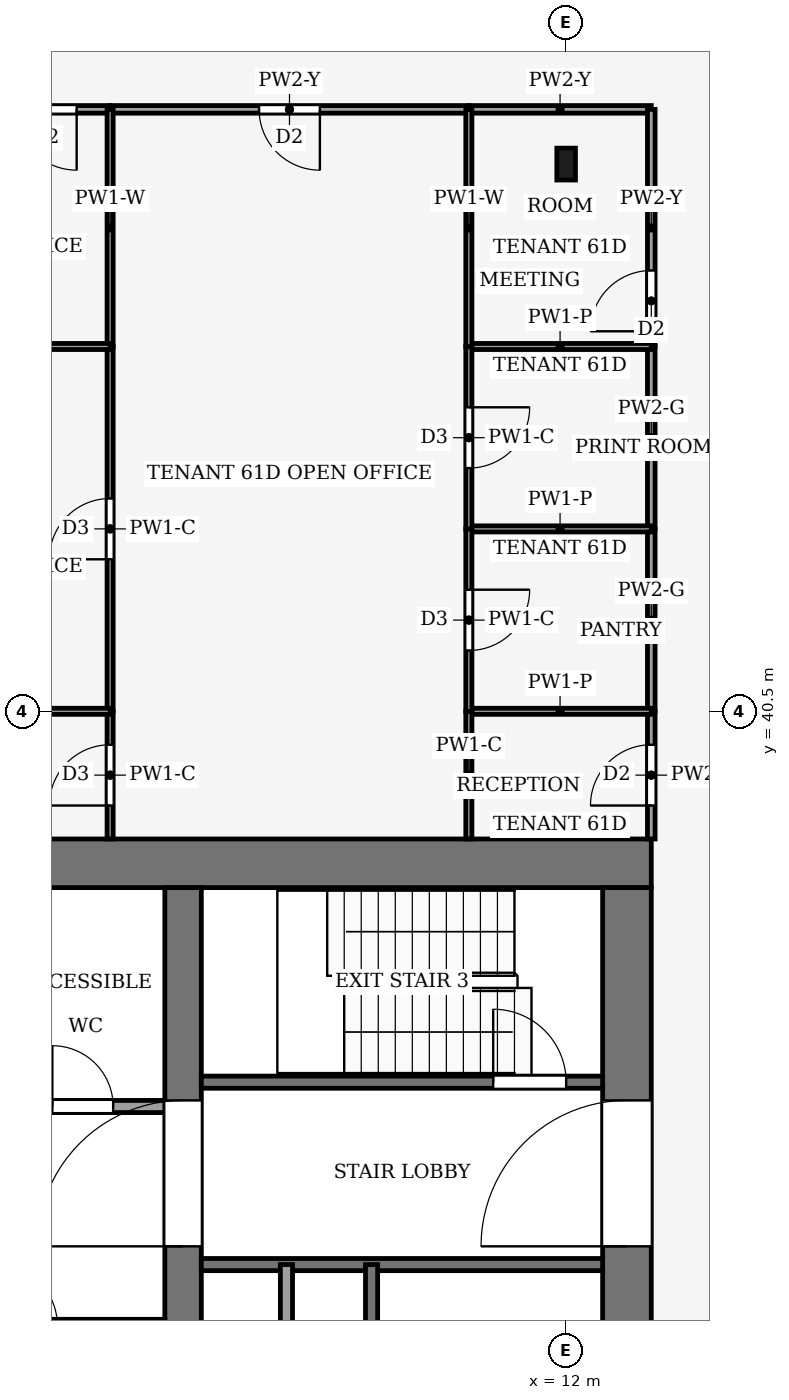
"""IFC4 building model, lengths in metres.
Left out: names, types, materials, properties, quantities, classifications, styles, units other than length and angle.
Written with IfcOpenShell. Run it as: python <this file> out.ifc"""

import sys

from ifc_helpers import new_model, si_unit, direction, frame, frame_2d, origin, origin_2d, place, context, subcontext, project, spatial, rectangle, i_section, extrude, element, fill, save


model = new_model("IFC4")
c1 = context("Model", 3, precision=1e-05, world=origin(), true_north=direction((0.0, 1.0)))
c2 = subcontext(c1, "Body", "Model", "MODEL_VIEW")
j1 = project(units=[si_unit("LENGTHUNIT", "METRE"), si_unit("PLANEANGLEUNIT", "RADIAN")], contexts=[c1])
p1 = place(None, origin())
s1 = spatial("IfcSite", under=j1, at=p1, CompositionType="ELEMENT")
p2 = place(p1, origin())
s2 = spatial("IfcBuilding", under=s1, at=p2, CompositionType="ELEMENT")
p3 = place(p2, frame((0.0, 0.0, 266.0)))
s3 = spatial("IfcBuildingStorey", under=s2, at=p3, CompositionType="ELEMENT", Elevation=266.0)
p4 = place(p3, frame((-13.4, 38.0, -0.13), z_axis=(0.0, 0.0, 1.0), x_axis=(1.0, 0.0, 0.0)))
e1 = element("IfcWall", 1, at=p4, inside=s3, PredefinedType="SHEAR", context=c2, shape_type="SweptSolid", body=[
    extrude(rectangle(XDim=26.8, YDim=0.8, at=frame_2d((13.4, 0.0))), origin(), (0.0, 0.0, 1.0), 4.0),
])
p5 = place(p3, frame((13.0, 18.4, -0.13), z_axis=(0.0, 0.0, 1.0), x_axis=(0.0, 1.0, 0.0)))
e2 = element("IfcWall", 2, at=p5, inside=s3, PredefinedType="SHEAR", context=c2, shape_type="SweptSolid", body=[
    extrude(rectangle(XDim=19.2, YDim=0.8, at=frame_2d((9.6, 0.0))), origin(), (0.0, 0.0, 1.0), 4.0),
])
p6 = place(p5, frame((2.8, 0.0, 0.13)))
e3 = element("IfcOpeningElement", 3, at=p6, cuts=e2, PredefinedType="OPENING", context=c2, shape_type="SweptSolid", body=[
    extrude(rectangle(XDim=2.4, YDim=2.4, at=frame_2d((1.2, 1.2))), frame((0.0, 0.41, 0.0), z_axis=(0.0, -1.0, 0.0), x_axis=(1.0, 0.0, 0.0)), (0.0, 0.0, 1.0), 0.82),
])
p7 = place(p5, frame((13.3, 0.0, 0.13)))
e4 = element("IfcOpeningElement", 4, at=p7, cuts=e2, PredefinedType="OPENING", context=c2, shape_type="SweptSolid", body=[
    extrude(rectangle(XDim=2.4, YDim=2.4, at=frame_2d((1.2, 1.2))), frame((0.0, 0.41, 0.0), z_axis=(0.0, -1.0, 0.0), x_axis=(1.0, 0.0, 0.0)), (0.0, 0.0, 1.0), 0.82),
])
p8 = place(p3, frame((5.7, 18.4, -0.13), z_axis=(0.0, 0.0, 1.0), x_axis=(0.0, 1.0, 0.0)))
e5 = element("IfcWall", 5, at=p8, inside=s3, PredefinedType="SHEAR", context=c2, shape_type="SweptSolid", body=[
    extrude(rectangle(XDim=19.2, YDim=0.6, at=frame_2d((9.6, 0.0))), origin(), (0.0, 0.0, 1.0), 4.0),
])
p9 = place(p8, frame((13.3, 0.0, 0.13)))
e6 = element("IfcOpeningElement", 6, at=p9, cuts=e5, PredefinedType="OPENING", context=c2, shape_type="SweptSolid", body=[
    extrude(rectangle(XDim=2.4, YDim=2.4, at=frame_2d((1.2, 1.2))), frame((0.0, 0.31, 0.0), z_axis=(0.0, -1.0, 0.0), x_axis=(1.0, 0.0, 0.0)), (0.0, 0.0, 1.0), 0.62),
])
p10 = place(p3, frame((12.0, 49.5, 0.0), z_axis=(0.0, 0.0, 1.0), x_axis=(1.0, 0.0, 0.0)))
e7 = element("IfcColumn", 7, at=p10, inside=s3, PredefinedType="COLUMN", context=c2, shape_type="SweptSolid", body=[
    extrude(i_section(OverallWidth=0.306, OverallDepth=0.524, WebThickness=0.012, FlangeThickness=0.04, FilletRadius=0.027, at=origin_2d()), origin(), (0.0, 0.0, 1.0), 4.0),
])
p11 = place(p3, frame((6.0, 31.4, 0.0), z_axis=(0.0, 0.0, 1.0), x_axis=(1.0, 0.0, 0.0)))
e8 = element("IfcWall", 8, at=p11, inside=s3, PredefinedType="PARTITIONING", context=c2, shape_type="SweptSolid", body=[
    extrude(rectangle(XDim=6.6, YDim=0.2, at=frame_2d((3.3, 0.0))), origin(), (0.0, 0.0, 1.0), 3.87),
])
p12 = place(p3, frame((-5.4, 34.0, 0.0), z_axis=(0.0, 0.0, 1.0), x_axis=(1.0, 0.0, 0.0)))
e9 = element("IfcWall", 9, at=p12, inside=s3, PredefinedType="PARTITIONING", context=c2, shape_type="SweptSolid", body=[
    extrude(rectangle(XDim=10.8, YDim=0.2, at=frame_2d((5.4, 0.0))), origin(), (0.0, 0.0, 1.0), 3.87),
])
p13 = place(p12, frame((6.15, 0.0, 0.0)))
e10 = element("IfcOpeningElement", 10, at=p13, cuts=e9, PredefinedType="OPENING", context=c2, shape_type="SweptSolid", body=[
    extrude(rectangle(XDim=1.2, YDim=2.2, at=frame_2d((0.6, 1.1))), frame((0.0, 0.11, 0.0), z_axis=(0.0, -1.0, 0.0), x_axis=(1.0, 0.0, 0.0)), (0.0, 0.0, 1.0), 0.22),
])
p14 = place(p12, frame((8.95, 0.0, 0.0)))
e11 = element("IfcOpeningElement", 11, at=p14, cuts=e9, PredefinedType="OPENING", context=c2, shape_type="SweptSolid", body=[
    extrude(rectangle(XDim=1.0, YDim=2.1, at=frame_2d((0.5, 1.05))), frame((0.0, 0.11, 0.0), z_axis=(0.0, -1.0, 0.0), x_axis=(1.0, 0.0, 0.0)), (0.0, 0.0, 1.0), 0.22),
])
p15 = place(p3, frame((6.0, 34.4, 0.0), z_axis=(0.0, 0.0, 1.0), x_axis=(1.0, 0.0, 0.0)))
e12 = element("IfcWall", 12, at=p15, inside=s3, PredefinedType="PARTITIONING", context=c2, shape_type="SweptSolid", body=[
    extrude(rectangle(XDim=6.6, YDim=0.2, at=frame_2d((3.3, 0.0))), origin(), (0.0, 0.0, 1.0), 3.87),
])
p16 = place(p15, frame((4.8, 0.0, 0.0)))
e13 = element("IfcOpeningElement", 13, at=p16, cuts=e12, PredefinedType="OPENING", context=c2, shape_type="SweptSolid", body=[
    extrude(rectangle(XDim=1.2, YDim=2.2, at=frame_2d((0.6, 1.1))), frame((0.0, 0.11, 0.0), z_axis=(0.0, -1.0, 0.0), x_axis=(1.0, 0.0, 0.0)), (0.0, 0.0, 1.0), 0.22),
])
for number, where, z_axis, x_axis in (
    (14, (7.4, 24.0, 0.0), (0.0, 0.0, 1.0), (0.0, 1.0, 0.0)),
    (15, (8.8, 24.0, 0.0), (0.0, 0.0, 1.0), (0.0, 1.0, 0.0)),
):
    element("IfcWall", number, at=place(p3, frame(where, z_axis=z_axis, x_axis=x_axis)), inside=s3, PredefinedType="PARTITIONING", context=c2, shape_type="SweptSolid", body=[
        extrude(rectangle(XDim=7.4, YDim=0.2, at=frame_2d((3.7, 0.0))), origin(), (0.0, 0.0, 1.0), 3.87),
    ])
p17 = place(p3, frame((13.4, 38.4, 0.0), z_axis=(0.0, 0.0, 1.0), x_axis=(0.0, 1.0, 0.0)))
e16 = element("IfcWall", 16, at=p17, inside=s3, PredefinedType="PARTITIONING", context=c2, shape_type="SweptSolid", body=[
    extrude(rectangle(XDim=2.1, YDim=0.125, at=frame_2d((1.05, 0.0))), origin(), (0.0, 0.0, 1.0), 3.14),
])
p18 = place(p17, frame((0.55, 0.0, 0.0)))
e17 = element("IfcOpeningElement", 17, at=p18, cuts=e16, PredefinedType="OPENING", context=c2, shape_type="SweptSolid", body=[
    extrude(rectangle(XDim=1.0, YDim=2.1, at=frame_2d((0.5, 1.05))), frame((0.0, 0.073, 0.0), z_axis=(0.0, -1.0, 0.0), x_axis=(1.0, 0.0, 0.0)), (0.0, 0.0, 1.0), 0.145),
])
for number, where, z_axis, x_axis in (
    (18, (13.4, 40.5, 0.0), (0.0, 0.0, 1.0), (0.0, 1.0, 0.0)),
    (19, (13.4, 43.5, 0.0), (0.0, 0.0, 1.0), (0.0, 1.0, 0.0)),
):
    element("IfcWall", number, at=place(p3, frame(where, z_axis=z_axis, x_axis=x_axis)), inside=s3, PredefinedType="PARTITIONING", context=c2, shape_type="SweptSolid", body=[
        extrude(rectangle(XDim=3.0, YDim=0.125, at=frame_2d((1.5, 0.0))), origin(), (0.0, 0.0, 1.0), 3.87),
    ])
p19 = place(p3, frame((13.4, 50.4, 0.0), z_axis=(0.0, 0.0, 1.0), x_axis=(-1.0, 0.0, 0.0)))
e20 = element("IfcWall", 20, at=p19, inside=s3, PredefinedType="PARTITIONING", context=c2, shape_type="SweptSolid", body=[
    extrude(rectangle(XDim=3.0, YDim=0.125, at=frame_2d((1.5, 0.0))), origin(), (0.0, 0.0, 1.0), 3.24),
])
p20 = place(p3, frame((13.4, 46.5, 0.0), z_axis=(0.0, 0.0, 1.0), x_axis=(0.0, 1.0, 0.0)))
e21 = element("IfcWall", 21, at=p20, inside=s3, PredefinedType="PARTITIONING", context=c2, shape_type="SweptSolid", body=[
    extrude(rectangle(XDim=3.9, YDim=0.125, at=frame_2d((1.95, 0.0))), origin(), (0.0, 0.0, 1.0), 3.24),
])
p21 = place(p20, frame((0.25, 0.0, 0.0)))
e22 = element("IfcOpeningElement", 22, at=p21, cuts=e21, PredefinedType="OPENING", context=c2, shape_type="SweptSolid", body=[
    extrude(rectangle(XDim=1.0, YDim=2.1, at=frame_2d((0.5, 1.05))), frame((0.0, 0.073, 0.0), z_axis=(0.0, -1.0, 0.0), x_axis=(1.0, 0.0, 0.0)), (0.0, 0.0, 1.0), 0.145),
])
p22 = place(p3, frame((10.4, 50.4, 0.0), z_axis=(0.0, 0.0, 1.0), x_axis=(-1.0, 0.0, 0.0)))
e23 = element("IfcWall", 23, at=p22, inside=s3, PredefinedType="PARTITIONING", context=c2, shape_type="SweptSolid", body=[
    extrude(rectangle(XDim=5.9, YDim=0.125, at=frame_2d((2.95, 0.0))), origin(), (0.0, 0.0, 1.0), 3.24),
])
p23 = place(p22, frame((2.45, 0.0, 0.0)))
e24 = element("IfcOpeningElement", 24, at=p23, cuts=e23, PredefinedType="OPENING", context=c2, shape_type="SweptSolid", body=[
    extrude(rectangle(XDim=1.0, YDim=2.1, at=frame_2d((0.5, 1.05))), frame((0.0, 0.073, 0.0), z_axis=(0.0, -1.0, 0.0), x_axis=(1.0, 0.0, 0.0)), (0.0, 0.0, 1.0), 0.145),
])
p24 = place(p3, frame((4.5, 50.4, 0.0), z_axis=(0.0, 0.0, 1.0), x_axis=(-1.0, 0.0, 0.0)))
e25 = element("IfcWall", 25, at=p24, inside=s3, PredefinedType="PARTITIONING", context=c2, shape_type="SweptSolid", body=[
    extrude(rectangle(XDim=4.5, YDim=0.125, at=frame_2d((2.25, 0.0))), origin(), (0.0, 0.0, 1.0), 3.24),
])
p25 = place(p24, frame((0.55, 0.0, 0.0)))
e26 = element("IfcOpeningElement", 26, at=p25, cuts=e25, PredefinedType="OPENING", context=c2, shape_type="SweptSolid", body=[
    extrude(rectangle(XDim=1.0, YDim=2.1, at=frame_2d((0.5, 1.05))), frame((0.0, 0.073, 0.0), z_axis=(0.0, -1.0, 0.0), x_axis=(1.0, 0.0, 0.0)), (0.0, 0.0, 1.0), 0.145),
])
p26 = place(p3, frame((13.4, 40.5, 0.0), z_axis=(0.0, 0.0, 1.0), x_axis=(-1.0, 0.0, 0.0)))
e27 = element("IfcWall", 27, at=p26, inside=s3, PredefinedType="PARTITIONING", context=c2, shape_type="SweptSolid", body=[
    extrude(rectangle(XDim=3.0, YDim=0.1, at=frame_2d((1.5, 0.0))), origin(), (0.0, 0.0, 1.0), 3.44),
])
p27 = place(p3, frame((10.4, 40.504, 0.0), z_axis=(0.0, 0.0, 1.0), x_axis=(0.0, -1.0, 0.0)))
e28 = element("IfcWall", 28, at=p27, inside=s3, PredefinedType="PARTITIONING", context=c2, shape_type="SweptSolid", body=[
    extrude(rectangle(XDim=2.104, YDim=0.1, at=frame_2d((1.052, 0.0))), origin(), (0.0, 0.0, 1.0), 3.87),
])
p28 = place(p3, frame((13.4, 43.5, 0.0), z_axis=(0.0, 0.0, 1.0), x_axis=(-1.0, 0.0, 0.0)))
e29 = element("IfcWall", 29, at=p28, inside=s3, PredefinedType="PARTITIONING", context=c2, shape_type="SweptSolid", body=[
    extrude(rectangle(XDim=3.0, YDim=0.1, at=frame_2d((1.5, 0.0))), origin(), (0.0, 0.0, 1.0), 3.44),
])
p29 = place(p3, frame((10.4, 43.504, 0.0), z_axis=(0.0, 0.0, 1.0), x_axis=(0.0, -1.0, 0.0)))
e30 = element("IfcWall", 30, at=p29, inside=s3, PredefinedType="PARTITIONING", context=c2, shape_type="SweptSolid", body=[
    extrude(rectangle(XDim=3.008, YDim=0.1, at=frame_2d((1.504, 0.0))), origin(), (0.0, 0.0, 1.0), 3.87),
])
p30 = place(p29, frame((1.004, 0.0, 0.0)))
e31 = element("IfcOpeningElement", 31, at=p30, cuts=e30, PredefinedType="OPENING", context=c2, shape_type="SweptSolid", body=[
    extrude(rectangle(XDim=1.0, YDim=2.1, at=frame_2d((0.5, 1.05))), frame((0.0, 0.06, 0.0), z_axis=(0.0, -1.0, 0.0), x_axis=(1.0, 0.0, 0.0)), (0.0, 0.0, 1.0), 0.12),
])
p31 = place(p3, frame((13.4, 46.5, 0.0), z_axis=(0.0, 0.0, 1.0), x_axis=(-1.0, 0.0, 0.0)))
e32 = element("IfcWall", 32, at=p31, inside=s3, PredefinedType="PARTITIONING", context=c2, shape_type="SweptSolid", body=[
    extrude(rectangle(XDim=3.0, YDim=0.1, at=frame_2d((1.5, 0.0))), origin(), (0.0, 0.0, 1.0), 3.44),
])
p32 = place(p3, frame((10.4, 46.504, 0.0), z_axis=(0.0, 0.0, 1.0), x_axis=(0.0, -1.0, 0.0)))
e33 = element("IfcWall", 33, at=p32, inside=s3, PredefinedType="PARTITIONING", context=c2, shape_type="SweptSolid", body=[
    extrude(rectangle(XDim=3.008, YDim=0.1, at=frame_2d((1.504, 0.0))), origin(), (0.0, 0.0, 1.0), 3.87),
])
p33 = place(p32, frame((1.004, 0.0, 0.0)))
e34 = element("IfcOpeningElement", 34, at=p33, cuts=e33, PredefinedType="OPENING", context=c2, shape_type="SweptSolid", body=[
    extrude(rectangle(XDim=1.0, YDim=2.1, at=frame_2d((0.5, 1.05))), frame((0.0, 0.06, 0.0), z_axis=(0.0, -1.0, 0.0), x_axis=(1.0, 0.0, 0.0)), (0.0, 0.0, 1.0), 0.12),
])
p34 = place(p3, frame((10.4, 50.4, 0.0), z_axis=(0.0, 0.0, 1.0), x_axis=(0.0, -1.0, 0.0)))
e35 = element("IfcWall", 35, at=p34, inside=s3, PredefinedType="PARTITIONING", context=c2, shape_type="SweptSolid", body=[
    extrude(rectangle(XDim=3.904, YDim=0.1, at=frame_2d((1.952, 0.0))), origin(), (0.0, 0.0, 1.0), 3.24),
])
p35 = place(p3, frame((4.5, 38.4, 0.0), z_axis=(0.0, 0.0, 1.0), x_axis=(0.0, 1.0, 0.0)))
e36 = element("IfcWall", 36, at=p35, inside=s3, PredefinedType="PARTITIONING", context=c2, shape_type="SweptSolid", body=[
    extrude(rectangle(XDim=2.1, YDim=0.1, at=frame_2d((1.05, 0.0))), origin(), (0.0, 0.0, 1.0), 3.87),
])
p36 = place(p35, frame((0.55, 0.0, 0.0)))
e37 = element("IfcOpeningElement", 37, at=p36, cuts=e36, PredefinedType="OPENING", context=c2, shape_type="SweptSolid", body=[
    extrude(rectangle(XDim=1.0, YDim=2.1, at=frame_2d((0.5, 1.05))), frame((0.0, 0.06, 0.0), z_axis=(0.0, -1.0, 0.0), x_axis=(1.0, 0.0, 0.0)), (0.0, 0.0, 1.0), 0.12),
])
p37 = place(p3, frame((4.5, 40.5, 0.0), z_axis=(0.0, 0.0, 1.0), x_axis=(0.0, 1.0, 0.0)))
e38 = element("IfcWall", 38, at=p37, inside=s3, PredefinedType="PARTITIONING", context=c2, shape_type="SweptSolid", body=[
    extrude(rectangle(XDim=6.0, YDim=0.1, at=frame_2d((3.0, 0.0))), origin(), (0.0, 0.0, 1.0), 3.87),
])
p38 = place(p37, frame((2.5, 0.0, 0.0)))
e39 = element("IfcOpeningElement", 39, at=p38, cuts=e38, PredefinedType="OPENING", context=c2, shape_type="SweptSolid", body=[
    extrude(rectangle(XDim=1.0, YDim=2.1, at=frame_2d((0.5, 1.05))), frame((0.0, 0.06, 0.0), z_axis=(0.0, -1.0, 0.0), x_axis=(1.0, 0.0, 0.0)), (0.0, 0.0, 1.0), 0.12),
])
p39 = place(p3, frame((4.5, 50.4, 0.0), z_axis=(0.0, 0.0, 1.0), x_axis=(0.0, -1.0, 0.0)))
e40 = element("IfcWall", 40, at=p39, inside=s3, PredefinedType="PARTITIONING", context=c2, shape_type="SweptSolid", body=[
    extrude(rectangle(XDim=3.9, YDim=0.1, at=frame_2d((1.95, 0.0))), origin(), (0.0, 0.0, 1.0), 3.24),
])
for number, where, z_axis, x_axis in (
    (41, (4.5, 40.5, 0.0), (0.0, 0.0, 1.0), (-1.0, 0.0, 0.0)),
    (42, (4.5, 46.5, 0.0), (0.0, 0.0, 1.0), (-1.0, 0.0, 0.0)),
):
    element("IfcWall", number, at=place(p3, frame(where, z_axis=z_axis, x_axis=x_axis)), inside=s3, PredefinedType="PARTITIONING", context=c2, shape_type="SweptSolid", body=[
        extrude(rectangle(XDim=4.5, YDim=0.1, at=frame_2d((2.25, 0.0))), origin(), (0.0, 0.0, 1.0), 3.44),
    ])
p40 = place(p14, origin())
e43 = element("IfcDoor", 43, at=p40, inside=s3, OperationType="SINGLE_SWING_LEFT", PredefinedType="DOOR", context=c2, shape_type="SweptSolid", body=[
    extrude(rectangle(XDim=1.0, YDim=2.1, at=frame_2d((0.5, 1.05))), frame((0.0, 0.025, 0.0), z_axis=(0.0, -1.0, 0.0), x_axis=(1.0, 0.0, 0.0)), (0.0, 0.0, 1.0), 0.05),
])
fill(e11, e43)
p41 = place(p16, origin())
e44 = element("IfcDoor", 44, at=p41, inside=s3, OperationType="SINGLE_SWING_RIGHT", PredefinedType="DOOR", context=c2, shape_type="SweptSolid", body=[
    extrude(rectangle(XDim=1.2, YDim=2.2, at=frame_2d((0.6, 1.1))), frame((0.0, 0.025, 0.0), z_axis=(0.0, -1.0, 0.0), x_axis=(1.0, 0.0, 0.0)), (0.0, 0.0, 1.0), 0.05),
])
fill(e13, e44)
p42 = place(p9, origin())
e45 = element("IfcDoor", 45, at=p42, inside=s3, OperationType="DOUBLE_DOOR_SINGLE_SWING", PredefinedType="DOOR", context=c2, shape_type="SweptSolid", body=[
    extrude(rectangle(XDim=2.4, YDim=2.4, at=frame_2d((1.2, 1.2))), frame((0.0, 0.025, 0.0), z_axis=(0.0, -1.0, 0.0), x_axis=(1.0, 0.0, 0.0)), (0.0, 0.0, 1.0), 0.05),
])
fill(e6, e45)
p43 = place(p7, origin())
e46 = element("IfcDoor", 46, at=p43, inside=s3, OperationType="DOUBLE_DOOR_SINGLE_SWING", PredefinedType="DOOR", context=c2, shape_type="SweptSolid", body=[
    extrude(rectangle(XDim=2.4, YDim=2.4, at=frame_2d((1.2, 1.2))), frame((0.0, 0.025, 0.0), z_axis=(0.0, -1.0, 0.0), x_axis=(1.0, 0.0, 0.0)), (0.0, 0.0, 1.0), 0.05),
])
fill(e4, e46)
p44 = place(p18, origin())
e47 = element("IfcDoor", 47, at=p44, inside=s3, OperationType="SINGLE_SWING_LEFT", PredefinedType="DOOR", context=c2, shape_type="SweptSolid", body=[
    extrude(rectangle(XDim=1.0, YDim=2.1, at=frame_2d((0.5, 1.05))), frame((0.0, 0.025, 0.0), z_axis=(0.0, -1.0, 0.0), x_axis=(1.0, 0.0, 0.0)), (0.0, 0.0, 1.0), 0.05),
])
fill(e17, e47)
p45 = place(p21, origin())
e48 = element("IfcDoor", 48, at=p45, inside=s3, OperationType="SINGLE_SWING_LEFT", PredefinedType="DOOR", context=c2, shape_type="SweptSolid", body=[
    extrude(rectangle(XDim=1.0, YDim=2.1, at=frame_2d((0.5, 1.05))), frame((0.0, 0.025, 0.0), z_axis=(0.0, -1.0, 0.0), x_axis=(1.0, 0.0, 0.0)), (0.0, 0.0, 1.0), 0.05),
])
fill(e22, e48)
p46 = place(p23, origin())
e49 = element("IfcDoor", 49, at=p46, inside=s3, OperationType="SINGLE_SWING_LEFT", PredefinedType="DOOR", context=c2, shape_type="SweptSolid", body=[
    extrude(rectangle(XDim=1.0, YDim=2.1, at=frame_2d((0.5, 1.05))), frame((0.0, 0.025, 0.0), z_axis=(0.0, -1.0, 0.0), x_axis=(1.0, 0.0, 0.0)), (0.0, 0.0, 1.0), 0.05),
])
fill(e24, e49)
p47 = place(p25, origin())
e50 = element("IfcDoor", 50, at=p47, inside=s3, OperationType="SINGLE_SWING_LEFT", PredefinedType="DOOR", context=c2, shape_type="SweptSolid", body=[
    extrude(rectangle(XDim=1.0, YDim=2.1, at=frame_2d((0.5, 1.05))), frame((0.0, 0.025, 0.0), z_axis=(0.0, -1.0, 0.0), x_axis=(1.0, 0.0, 0.0)), (0.0, 0.0, 1.0), 0.05),
])
fill(e26, e50)
p48 = place(p30, origin())
e51 = element("IfcDoor", 51, at=p48, inside=s3, OperationType="SINGLE_SWING_RIGHT", PredefinedType="DOOR", context=c2, shape_type="SweptSolid", body=[
    extrude(rectangle(XDim=1.0, YDim=2.1, at=frame_2d((0.5, 1.05))), frame((0.0, 0.025, 0.0), z_axis=(0.0, -1.0, 0.0), x_axis=(1.0, 0.0, 0.0)), (0.0, 0.0, 1.0), 0.05),
])
fill(e31, e51)
p49 = place(p33, origin())
e52 = element("IfcDoor", 52, at=p49, inside=s3, OperationType="SINGLE_SWING_LEFT", PredefinedType="DOOR", context=c2, shape_type="SweptSolid", body=[
    extrude(rectangle(XDim=1.0, YDim=2.1, at=frame_2d((0.5, 1.05))), frame((0.0, 0.025, 0.0), z_axis=(0.0, -1.0, 0.0), x_axis=(1.0, 0.0, 0.0)), (0.0, 0.0, 1.0), 0.05),
])
fill(e34, e52)
p50 = place(p36, origin())
e53 = element("IfcDoor", 53, at=p50, inside=s3, OperationType="SINGLE_SWING_RIGHT", PredefinedType="DOOR", context=c2, shape_type="SweptSolid", body=[
    extrude(rectangle(XDim=1.0, YDim=2.1, at=frame_2d((0.5, 1.05))), frame((0.0, 0.025, 0.0), z_axis=(0.0, -1.0, 0.0), x_axis=(1.0, 0.0, 0.0)), (0.0, 0.0, 1.0), 0.05),
])
fill(e37, e53)
p51 = place(p38, origin())
e54 = element("IfcDoor", 54, at=p51, inside=s3, OperationType="SINGLE_SWING_LEFT", PredefinedType="DOOR", context=c2, shape_type="SweptSolid", body=[
    extrude(rectangle(XDim=1.0, YDim=2.1, at=frame_2d((0.5, 1.05))), frame((0.0, 0.025, 0.0), z_axis=(0.0, -1.0, 0.0), x_axis=(1.0, 0.0, 0.0)), (0.0, 0.0, 1.0), 0.05),
])
fill(e39, e54)
save(model, sys.argv[1])
